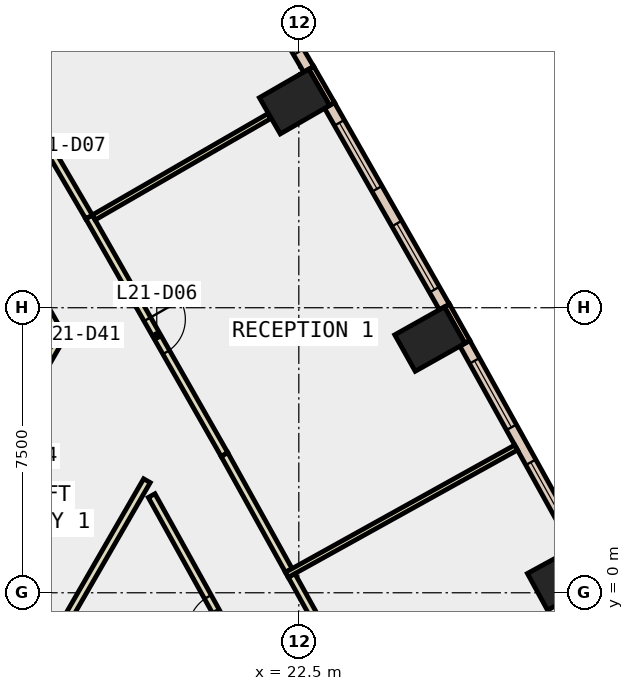
"""IFC4 building model, lengths in metres.
Left out: names, types, materials, properties, quantities, classifications, styles, units other than length and angle.
Written with IfcOpenShell. Run it as: python <this file> out.ifc"""

import sys

from ifc_helpers import new_model, si_unit, direction, frame, frame_2d, origin, origin_2d, place, context, subcontext, project, spatial, rectangle, extrude, element, fill, save


model = new_model("IFC4")
c1 = context("Model", 3, precision=1e-05, world=origin(), true_north=direction((0.0, 1.0)))
c2 = subcontext(c1, "Body", "Model", "MODEL_VIEW")
j1 = project(units=[si_unit("LENGTHUNIT", "METRE"), si_unit("PLANEANGLEUNIT", "RADIAN")], contexts=[c1])
p1 = place(None, origin())
s1 = spatial("IfcSite", under=j1, at=p1, CompositionType="ELEMENT")
p2 = place(p1, origin())
s2 = spatial("IfcBuilding", under=s1, at=p2, CompositionType="ELEMENT")
p3 = place(p2, frame((0.0, 0.0, 99.2)))
s3 = spatial("IfcBuildingStorey", under=s2, at=p3, CompositionType="ELEMENT", Elevation=99.2)
for number, where, z_axis, x_axis in (
    (1, (29.438, 0.385, -0.4), (0.0, 0.0, 1.0), (-0.48, 0.877, 0.0)),
    (2, (25.948, 6.675, -0.4), (0.0, 0.0, 1.0), (-0.49, 0.872, 0.0)),
    (3, (22.387, 12.925, -0.4), (0.0, 0.0, 1.0), (-0.5, 0.866, 0.0)),
):
    element("IfcColumn", number, at=place(p3, frame(where, z_axis=z_axis, x_axis=x_axis)), inside=s3, PredefinedType="COLUMN", context=c2, shape_type="SweptSolid", body=[
        extrude(rectangle(XDim=1.1, YDim=1.5, at=origin_2d()), origin(), (0.0, 0.0, 1.0), 4.2),
    ])
p4 = place(p3, frame((26.937, 6.6, 0.0), z_axis=(0.0, 0.0, 1.0), x_axis=(-0.490008344094, 0.871717742574, 0.0)))
e4 = element("IfcWall", 4, at=p4, inside=s3, PredefinedType="STANDARD", context=c2, shape_type="SweptSolid", body=[
    extrude(rectangle(XDim=1.1, YDim=0.15, at=frame_2d((0.55, 0.0))), origin(), (0.0, 0.0, 1.0), 3.8),
])
p5 = place(p3, frame((23.376, 12.861, 0.0), z_axis=(0.0, 0.0, 1.0), x_axis=(-0.499933745558, 0.866063652425, 0.0)))
e5 = element("IfcWall", 5, at=p5, inside=s3, PredefinedType="STANDARD", context=c2, shape_type="SweptSolid", body=[
    extrude(rectangle(XDim=1.1, YDim=0.15, at=frame_2d((0.55, 0.0))), origin(), (0.0, 0.0, 1.0), 3.8),
])
p6 = place(p3, frame((29.83, 1.225, 0.0), z_axis=(0.0, 0.0, 1.0), x_axis=(-0.485170774404, 0.874419418623, 0.0)))
e6 = element("IfcWall", 6, at=p6, inside=s3, PredefinedType="STANDARD", context=c2, shape_type="SweptSolid", body=[
    extrude(rectangle(XDim=6.103, YDim=0.3, at=frame_2d((3.052, 0.0))), origin(), (0.0, 0.0, 1.0), 3.8),
])
p7 = place(p6, frame((0.526, 0.0, 0.9)))
e7 = element("IfcOpeningElement", 7, at=p7, cuts=e6, PredefinedType="OPENING", context=c2, shape_type="SweptSolid", body=[
    extrude(rectangle(XDim=2.0, YDim=2.6, at=frame_2d((1.0, 1.3))), frame((0.0, 0.16, 0.0), z_axis=(0.0, -1.0, 0.0), x_axis=(1.0, 0.0, 0.0)), (0.0, 0.0, 1.0), 0.32),
])
p8 = place(p6, frame((3.578, 0.0, 0.9)))
e8 = element("IfcOpeningElement", 8, at=p8, cuts=e6, PredefinedType="OPENING", context=c2, shape_type="SweptSolid", body=[
    extrude(rectangle(XDim=2.0, YDim=2.6, at=frame_2d((1.0, 1.3))), frame((0.0, 0.16, 0.0), z_axis=(0.0, -1.0, 0.0), x_axis=(1.0, 0.0, 0.0)), (0.0, 0.0, 1.0), 0.32),
])
p9 = place(p3, frame((26.33, 7.52, 0.0), z_axis=(0.0, 0.0, 1.0), x_axis=(-0.495113375427, 0.868828375154, 0.0)))
e9 = element("IfcWall", 9, at=p9, inside=s3, PredefinedType="STANDARD", context=c2, shape_type="SweptSolid", body=[
    extrude(rectangle(XDim=6.104, YDim=0.3, at=frame_2d((3.052, 0.0))), origin(), (0.0, 0.0, 1.0), 3.8),
])
p10 = place(p9, frame((0.526, 0.0, 0.9)))
e10 = element("IfcOpeningElement", 10, at=p10, cuts=e9, PredefinedType="OPENING", context=c2, shape_type="SweptSolid", body=[
    extrude(rectangle(XDim=2.0, YDim=2.6, at=frame_2d((1.0, 1.3))), frame((0.0, 0.16, 0.0), z_axis=(0.0, -1.0, 0.0), x_axis=(1.0, 0.0, 0.0)), (0.0, 0.0, 1.0), 0.32),
])
p11 = place(p9, frame((3.578, 0.0, 0.9)))
e11 = element("IfcOpeningElement", 11, at=p11, cuts=e9, PredefinedType="OPENING", context=c2, shape_type="SweptSolid", body=[
    extrude(rectangle(XDim=2.0, YDim=2.6, at=frame_2d((1.0, 1.3))), frame((0.0, 0.16, 0.0), z_axis=(0.0, -1.0, 0.0), x_axis=(1.0, 0.0, 0.0)), (0.0, 0.0, 1.0), 0.32),
])
p12 = place(p3, frame((22.759, 13.774, 0.0), z_axis=(0.0, 0.0, 1.0), x_axis=(-0.50490018297, 0.863177736759, 0.0)))
e12 = element("IfcWall", 12, at=p12, inside=s3, PredefinedType="STANDARD", context=c2, shape_type="SweptSolid", body=[
    extrude(rectangle(XDim=6.104, YDim=0.3, at=frame_2d((3.052, 0.0))), origin(), (0.0, 0.0, 1.0), 3.8),
])
p13 = place(p12, frame((0.526, 0.0, 0.9)))
e13 = element("IfcOpeningElement", 13, at=p13, cuts=e12, PredefinedType="OPENING", context=c2, shape_type="SweptSolid", body=[
    extrude(rectangle(XDim=2.0, YDim=2.6, at=frame_2d((1.0, 1.3))), frame((0.0, 0.16, 0.0), z_axis=(0.0, -1.0, 0.0), x_axis=(1.0, 0.0, 0.0)), (0.0, 0.0, 1.0), 0.32),
])
p14 = place(p12, frame((3.578, 0.0, 0.9)))
e14 = element("IfcOpeningElement", 14, at=p14, cuts=e12, PredefinedType="OPENING", context=c2, shape_type="SweptSolid", body=[
    extrude(rectangle(XDim=2.0, YDim=2.6, at=frame_2d((1.0, 1.3))), frame((0.0, 0.16, 0.0), z_axis=(0.0, -1.0, 0.0), x_axis=(1.0, 0.0, 0.0)), (0.0, 0.0, 1.0), 0.32),
])
p15 = place(p3, frame((16.195, 6.824, 0.0), z_axis=(0.0, 0.0, 1.0), x_axis=(-0.494984897559, 0.868901577388, 0.0)))
e15 = element("IfcWall", 15, at=p15, inside=s3, PredefinedType="PARTITIONING", context=c2, shape_type="SweptSolid", body=[
    extrude(rectangle(XDim=2.188, YDim=0.2, at=frame_2d((1.094, 0.0))), origin(), (0.0, 0.0, 1.0), 3.8),
])
p16 = place(p3, frame((22.071, -3.65, 0.0), z_axis=(0.0, 0.0, 1.0), x_axis=(-0.485198988697, 0.874403763354, 0.0)))
e16 = element("IfcWall", 16, at=p16, inside=s3, PredefinedType="PARTITIONING", context=c2, shape_type="SweptSolid", body=[
    extrude(rectangle(XDim=7.098, YDim=0.2, at=frame_2d((3.549, 0.0))), origin(), (0.0, 0.0, 1.0), 3.8),
])
p17 = place(p16, frame((3.049, 0.0, 0.0)))
e17 = element("IfcOpeningElement", 17, at=p17, cuts=e16, PredefinedType="OPENING", context=c2, shape_type="SweptSolid", body=[
    extrude(rectangle(XDim=1.0, YDim=2.1, at=frame_2d((0.5, 1.05))), frame((0.0, 0.11, 0.0), z_axis=(0.0, -1.0, 0.0), x_axis=(1.0, 0.0, 0.0)), (0.0, 0.0, 1.0), 0.22),
])
p18 = place(p3, frame((22.309, 0.456, 0.0), z_axis=(0.0, 0.0, 1.0), x_axis=(0.484982854201, -0.87452365956, 0.0)))
e18 = element("IfcWall", 18, at=p18, inside=s3, PredefinedType="PARTITIONING", context=c2, shape_type="SweptSolid", body=[
    extrude(rectangle(XDim=3.487, YDim=0.2, at=frame_2d((1.743, 0.0))), origin(), (0.0, 0.0, 1.0), 3.8),
])
p19 = place(p3, frame((16.98, 9.89, 0.0), z_axis=(0.0, 0.0, 1.0), x_axis=(0.495123170501, -0.868822793228, 0.0)))
e19 = element("IfcWall", 19, at=p19, inside=s3, PredefinedType="PARTITIONING", context=c2, shape_type="SweptSolid", body=[
    extrude(rectangle(XDim=7.198, YDim=0.2, at=frame_2d((3.599, 0.0))), origin(), (0.0, 0.0, 1.0), 3.8),
])
p20 = place(p19, frame((3.099, 0.0, 0.0)))
e20 = element("IfcOpeningElement", 20, at=p20, cuts=e19, PredefinedType="OPENING", context=c2, shape_type="SweptSolid", body=[
    extrude(rectangle(XDim=1.0, YDim=2.1, at=frame_2d((0.5, 1.05))), frame((0.0, 0.11, 0.0), z_axis=(0.0, -1.0, 0.0), x_axis=(1.0, 0.0, 0.0)), (0.0, 0.0, 1.0), 0.22),
])
p21 = place(p3, frame((20.544, 3.636, 0.0), z_axis=(0.0, 0.0, 1.0), x_axis=(0.485250552989, -0.874375148792, 0.0)))
e21 = element("IfcWall", 21, at=p21, inside=s3, PredefinedType="PARTITIONING", context=c2, shape_type="SweptSolid", body=[
    extrude(rectangle(XDim=3.487, YDim=0.2, at=frame_2d((1.744, 0.0))), origin(), (0.0, 0.0, 1.0), 3.8),
])
p22 = place(p3, frame((13.383, 16.039, 0.0), z_axis=(0.0, 0.0, 1.0), x_axis=(0.504806221623, -0.863232690884, 0.0)))
e22 = element("IfcWall", 22, at=p22, inside=s3, PredefinedType="PARTITIONING", context=c2, shape_type="SweptSolid", body=[
    extrude(rectangle(XDim=7.124, YDim=0.2, at=frame_2d((3.562, 0.0))), origin(), (0.0, 0.0, 1.0), 3.8),
])
p23 = place(p22, frame((3.137, 0.0, 0.0)))
e23 = element("IfcOpeningElement", 23, at=p23, cuts=e22, PredefinedType="OPENING", context=c2, shape_type="SweptSolid", body=[
    extrude(rectangle(XDim=1.0, YDim=2.1, at=frame_2d((0.5, 1.05))), frame((0.0, 0.11, 0.0), z_axis=(0.0, -1.0, 0.0), x_axis=(1.0, 0.0, 0.0)), (0.0, 0.0, 1.0), 0.22),
])
p24 = place(p3, frame((13.827, 2.55, 0.0), z_axis=(0.0, 0.0, 1.0), x_axis=(0.500070719615, 0.865984569946, 0.0)))
e24 = element("IfcWall", 24, at=p24, inside=s3, PredefinedType="PARTITIONING", context=c2, shape_type="SweptSolid", body=[
    extrude(rectangle(XDim=4.935, YDim=0.2, at=frame_2d((2.468, 0.0))), origin(), (0.0, 0.0, 1.0), 3.8),
])
p25 = place(p24, frame((1.968, 0.0, 0.0)))
e25 = element("IfcOpeningElement", 25, at=p25, cuts=e24, PredefinedType="OPENING", context=c2, shape_type="SweptSolid", body=[
    extrude(rectangle(XDim=1.0, YDim=2.1, at=frame_2d((0.5, 1.05))), frame((0.0, 0.11, 0.0), z_axis=(0.0, -1.0, 0.0), x_axis=(1.0, 0.0, 0.0)), (0.0, 0.0, 1.0), 0.22),
])
p26 = place(p24, frame((3.068, 0.0, 0.0)))
e26 = element("IfcOpeningElement", 26, at=p26, cuts=e24, PredefinedType="OPENING", context=c2, shape_type="SweptSolid", body=[
    extrude(rectangle(XDim=1.0, YDim=2.1, at=frame_2d((0.5, 1.05))), frame((0.0, 0.11, 0.0), z_axis=(0.0, -1.0, 0.0), x_axis=(1.0, 0.0, 0.0)), (0.0, 0.0, 1.0), 0.22),
])
p27 = place(p3, frame((18.503, 2.949, 0.0), z_axis=(0.0, 0.0, 1.0), x_axis=(-0.49997390151, -0.86604047123, 0.0)))
e27 = element("IfcWall", 27, at=p27, inside=s3, PredefinedType="PARTITIONING", context=c2, shape_type="SweptSolid", body=[
    extrude(rectangle(XDim=11.626, YDim=0.2, at=frame_2d((5.813, 0.0))), origin(), (0.0, 0.0, 1.0), 3.8),
])
p28 = place(p3, frame((22.185, 0.473, 0.0), z_axis=(0.0, 0.0, 1.0), x_axis=(0.874372498137, 0.485255329184, 0.0)))
e28 = element("IfcWall", 28, at=p28, inside=s3, PredefinedType="PARTITIONING", context=c2, shape_type="SweptSolid", body=[
    extrude(rectangle(XDim=6.9, YDim=0.15, at=frame_2d((3.45, 0.0))), origin(), (0.0, 0.0, 1.0), 3.8),
])
p29 = place(p3, frame((17.104, 9.875, 0.0), z_axis=(0.0, 0.0, 1.0), x_axis=(0.866024640963, 0.500001321243, 0.0)))
e29 = element("IfcWall", 29, at=p29, inside=s3, PredefinedType="PARTITIONING", context=c2, shape_type="SweptSolid", body=[
    extrude(rectangle(XDim=5.33, YDim=0.15, at=frame_2d((2.665, 0.0))), origin(), (0.0, 0.0, 1.0), 3.8),
])
p30 = place(p7, origin())
e30 = element("IfcWindow", 30, at=p30, inside=s3, PartitioningType="SINGLE_PANEL", PredefinedType="WINDOW", context=c2, shape_type="SweptSolid", body=[
    extrude(rectangle(XDim=2.0, YDim=2.6, at=frame_2d((1.0, 1.3))), frame((0.0, 0.03, 0.0), z_axis=(0.0, -1.0, 0.0), x_axis=(1.0, 0.0, 0.0)), (0.0, 0.0, 1.0), 0.06),
])
fill(e7, e30)
p31 = place(p8, origin())
e31 = element("IfcWindow", 31, at=p31, inside=s3, PartitioningType="SINGLE_PANEL", PredefinedType="WINDOW", context=c2, shape_type="SweptSolid", body=[
    extrude(rectangle(XDim=2.0, YDim=2.6, at=frame_2d((1.0, 1.3))), frame((0.0, 0.03, 0.0), z_axis=(0.0, -1.0, 0.0), x_axis=(1.0, 0.0, 0.0)), (0.0, 0.0, 1.0), 0.06),
])
fill(e8, e31)
p32 = place(p10, origin())
e32 = element("IfcWindow", 32, at=p32, inside=s3, PartitioningType="SINGLE_PANEL", PredefinedType="WINDOW", context=c2, shape_type="SweptSolid", body=[
    extrude(rectangle(XDim=2.0, YDim=2.6, at=frame_2d((1.0, 1.3))), frame((0.0, 0.03, 0.0), z_axis=(0.0, -1.0, 0.0), x_axis=(1.0, 0.0, 0.0)), (0.0, 0.0, 1.0), 0.06),
])
fill(e10, e32)
p33 = place(p11, origin())
e33 = element("IfcWindow", 33, at=p33, inside=s3, PartitioningType="SINGLE_PANEL", PredefinedType="WINDOW", context=c2, shape_type="SweptSolid", body=[
    extrude(rectangle(XDim=2.0, YDim=2.6, at=frame_2d((1.0, 1.3))), frame((0.0, 0.03, 0.0), z_axis=(0.0, -1.0, 0.0), x_axis=(1.0, 0.0, 0.0)), (0.0, 0.0, 1.0), 0.06),
])
fill(e11, e33)
p34 = place(p13, origin())
e34 = element("IfcWindow", 34, at=p34, inside=s3, PartitioningType="SINGLE_PANEL", PredefinedType="WINDOW", context=c2, shape_type="SweptSolid", body=[
    extrude(rectangle(XDim=2.0, YDim=2.6, at=frame_2d((1.0, 1.3))), frame((0.0, 0.03, 0.0), z_axis=(0.0, -1.0, 0.0), x_axis=(1.0, 0.0, 0.0)), (0.0, 0.0, 1.0), 0.06),
])
fill(e13, e34)
p35 = place(p20, origin())
e35 = element("IfcDoor", 35, at=p35, inside=s3, OperationType="SINGLE_SWING_LEFT", PredefinedType="DOOR", context=c2, shape_type="SweptSolid", body=[
    extrude(rectangle(XDim=1.0, YDim=2.1, at=frame_2d((0.5, 1.05))), frame((0.0, 0.025, 0.0), z_axis=(0.0, -1.0, 0.0), x_axis=(1.0, 0.0, 0.0)), (0.0, 0.0, 1.0), 0.05),
])
fill(e20, e35)
p36 = place(p17, origin())
e36 = element("IfcDoor", 36, at=p36, inside=s3, OperationType="SINGLE_SWING_RIGHT", PredefinedType="DOOR", context=c2, shape_type="SweptSolid", body=[
    extrude(rectangle(XDim=1.0, YDim=2.1, at=frame_2d((0.5, 1.05))), frame((0.0, 0.025, 0.0), z_axis=(0.0, -1.0, 0.0), x_axis=(1.0, 0.0, 0.0)), (0.0, 0.0, 1.0), 0.05),
])
fill(e17, e36)
save(model, sys.argv[1])
